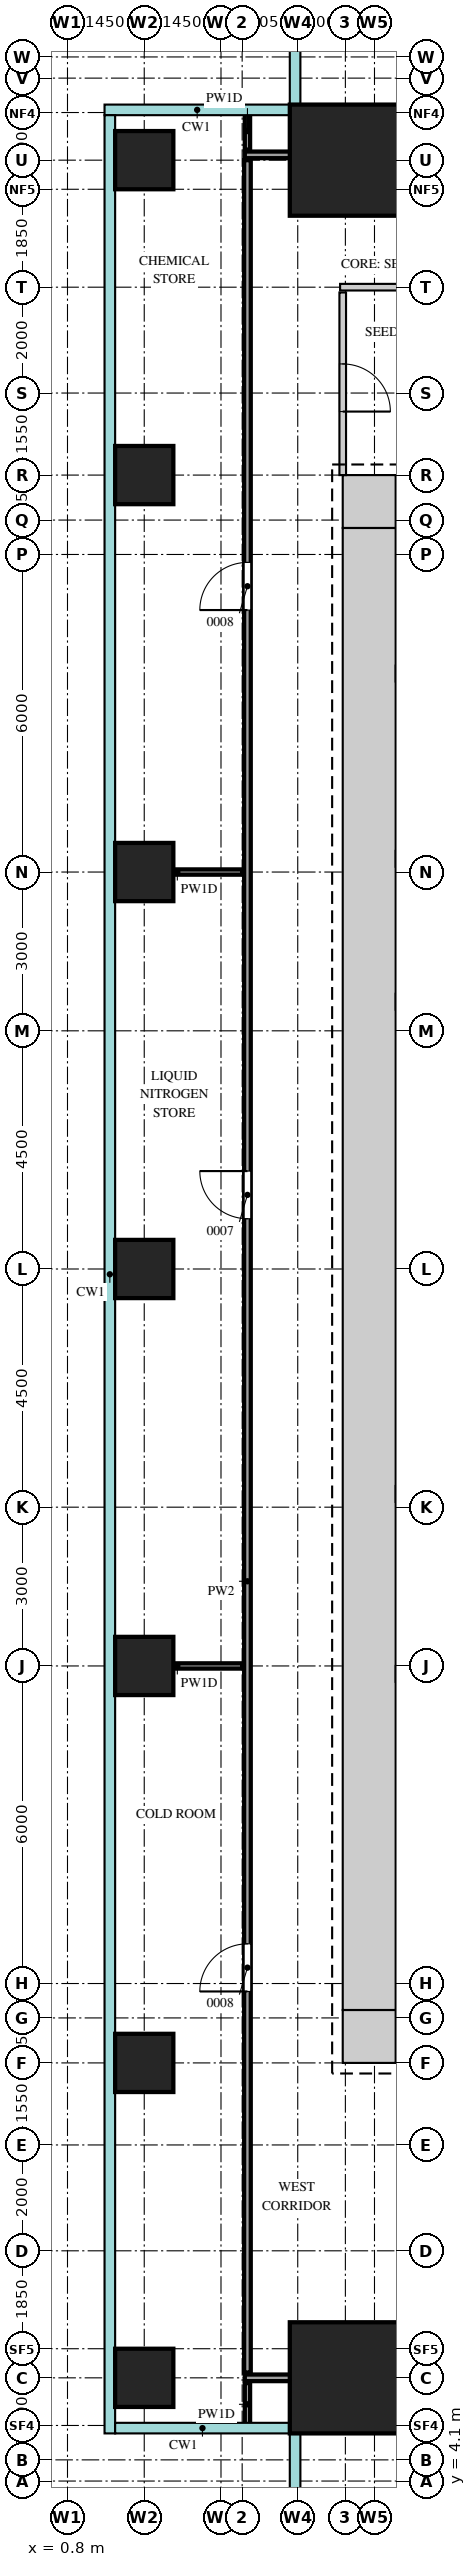
"""IFC4 building model, lengths in metres.
Left out: names, types, materials, properties, quantities, classifications, styles, units other than length and angle.
Written with IfcOpenShell. Run it as: python <this file> out.ifc"""

import sys

from ifc_helpers import new_model, si_unit, direction, frame, frame_2d, origin, origin_2d, place, context, subcontext, project, spatial, rectangle, extrude, source, transform, mapped, element, fill, save


model = new_model("IFC4")
c1 = context("Model", 3, precision=1e-05, world=origin(), true_north=direction((0.0, 1.0)))
c2 = subcontext(c1, "Body", "Model", "MODEL_VIEW")
j1 = project(units=[si_unit("LENGTHUNIT", "METRE"), si_unit("PLANEANGLEUNIT", "RADIAN")], contexts=[c1])
p1 = place(None, origin())
s1 = spatial("IfcSite", under=j1, at=p1, CompositionType="ELEMENT")
p2 = place(p1, origin())
s2 = spatial("IfcBuilding", under=s1, at=p2, CompositionType="ELEMENT")
p3 = place(p2, frame((0.0, 0.0, 110.3)))
s3 = spatial("IfcBuildingStorey", under=s2, at=p3, CompositionType="ELEMENT", Elevation=110.3)
m1 = source(origin(), c2, "Body", "SweptSolid", [
    extrude(rectangle(XDim=1.0, YDim=1.0, at=frame_2d((0.5, 0.0))), origin(), (0.0, 0.0, 1.0), 4.1),
])
for number, where, z_axis, x_axis in (
    (1, (6.0, 41.5, 0.0), (0.0, 0.0, 1.0), (1.0, 0.0, 0.0)),
    (2, (6.0, 12.5, 0.0), (0.0, 0.0, 1.0), (1.0, 0.0, 0.0)),
):
    element("IfcWall", number, at=place(p3, frame(where, z_axis=z_axis, x_axis=x_axis)), inside=s3, PredefinedType="SHEAR", context=c2, shape_type="MappedRepresentation", body=[
        mapped(m1, transform((0.0, 0.0, 0.0))),
    ])
m2 = source(origin(), c2, "Body", "SweptSolid", [
    extrude(rectangle(XDim=28.0, YDim=1.0, at=frame_2d((14.0, 0.0))), origin(), (0.0, 0.0, 1.0), 4.1),
])
p4 = place(p3, frame((6.5, 13.0, 0.0), z_axis=(0.0, 0.0, 1.0), x_axis=(0.0, 1.0, 0.0)))
e3 = element("IfcWall", 3, at=p4, inside=s3, PredefinedType="SHEAR", context=c2, shape_type="MappedRepresentation", body=[
    mapped(m2, transform((0.0, 0.0, 0.0))),
])
m3 = source(origin(), c2, "Body", "SweptSolid", [
    extrude(rectangle(XDim=2.1, YDim=2.1, at=origin_2d()), origin(), (0.0, 0.0, 1.0), 4.4),
])
for number, where, z_axis, x_axis in (
    (4, (6.05, 47.95, 0.0), (0.0, 0.0, 1.0), (1.0, 0.0, 0.0)),
    (5, (6.05, 6.05, 0.0), (0.0, 0.0, 1.0), (1.0, 0.0, 0.0)),
):
    element("IfcColumn", number, at=place(p3, frame(where, z_axis=z_axis, x_axis=x_axis)), inside=s3, PredefinedType="COLUMN", context=c2, shape_type="MappedRepresentation", body=[
        mapped(m3, transform((0.0, 0.0, 0.0))),
    ])
m4 = source(origin(), c2, "Body", "SweptSolid", [
    extrude(rectangle(XDim=1.1, YDim=1.1, at=origin_2d()), origin(), (0.0, 0.0, 1.0), 4.1),
])
for number, where, z_axis, x_axis in (
    (6, (2.25, 6.05, 0.0), (0.0, 0.0, 1.0), (1.0, 0.0, 0.0)),
    (7, (2.25, 12.0, 0.0), (0.0, 0.0, 1.0), (1.0, 0.0, 0.0)),
    (8, (2.25, 19.5, 0.0), (0.0, 0.0, 1.0), (1.0, 0.0, 0.0)),
    (9, (2.25, 27.0, 0.0), (0.0, 0.0, 1.0), (1.0, 0.0, 0.0)),
    (10, (2.25, 34.5, 0.0), (0.0, 0.0, 1.0), (1.0, 0.0, 0.0)),
    (11, (2.25, 42.0, 0.0), (0.0, 0.0, 1.0), (1.0, 0.0, 0.0)),
    (12, (2.25, 47.95, 0.0), (0.0, 0.0, 1.0), (1.0, 0.0, 0.0)),
):
    element("IfcColumn", number, at=place(p3, frame(where, z_axis=z_axis, x_axis=x_axis)), inside=s3, PredefinedType="COLUMN", context=c2, shape_type="MappedRepresentation", body=[
        mapped(m4, transform((0.0, 0.0, 0.0))),
    ])
m5 = source(origin(), c2, "Body", "SweptSolid", [
    extrude(rectangle(XDim=0.8, YDim=0.1, at=frame_2d((0.4, 0.0))), origin(), (0.0, 0.0, 1.0), 4.2),
])
p5 = place(p3, frame((4.2, 5.15, 0.0), z_axis=(0.0, 0.0, 1.0), x_axis=(0.0, 1.0, 0.0)))
e13 = element("IfcWall", 13, at=p5, inside=s3, PredefinedType="PARTITIONING", context=c2, shape_type="MappedRepresentation", body=[
    mapped(m5, transform((0.0, 0.0, 0.0))),
])
m6 = source(origin(), c2, "Body", "SweptSolid", [
    extrude(rectangle(XDim=22.3, YDim=0.125, at=frame_2d((11.15, 0.0))), origin(), (0.0, 0.0, 1.0), 3.55),
])
p6 = place(p3, frame((4.15, 6.05, 0.0), z_axis=(0.0, 0.0, 1.0), x_axis=(1.0, 0.0, 0.0)))
e14 = element("IfcWall", 14, at=p6, inside=s3, PredefinedType="PARTITIONING", context=c2, shape_type="MappedRepresentation", body=[
    mapped(m6, transform((0.0, 0.0, 0.0))),
])
m7 = source(origin(), c2, "Body", "SweptSolid", [
    extrude(rectangle(XDim=0.9, YDim=2.1, at=frame_2d((0.45, 1.05))), frame((0.0, 0.073, 0.0), z_axis=(0.0, -1.0, 0.0), x_axis=(1.0, 0.0, 0.0)), (0.0, 0.0, 1.0), 0.145),
])
p7 = place(p6, frame((3.5, 0.0, 0.0)))
e15 = element("IfcOpeningElement", 15, at=p7, cuts=e14, PredefinedType="OPENING", context=c2, shape_type="MappedRepresentation", body=[
    mapped(m7, transform((0.0, 0.0, 0.0))),
])
p8 = place(p6, frame((11.0, 0.0, 0.0)))
e16 = element("IfcOpeningElement", 16, at=p8, cuts=e14, PredefinedType="OPENING", context=c2, shape_type="MappedRepresentation", body=[
    mapped(m7, transform((0.0, 0.0, 0.0))),
])
p9 = place(p6, frame((18.35, 0.0, 0.0)))
e17 = element("IfcOpeningElement", 17, at=p9, cuts=e14, PredefinedType="OPENING", context=c2, shape_type="MappedRepresentation", body=[
    mapped(m7, transform((0.0, 0.0, 0.0))),
])
m8 = source(origin(), c2, "Body", "SweptSolid", [
    extrude(rectangle(XDim=41.8, YDim=0.125, at=frame_2d((20.9, 0.0))), origin(), (0.0, 0.0, 1.0), 4.2),
])
p10 = place(p3, frame((4.2, 6.15, 0.0), z_axis=(0.0, 0.0, 1.0), x_axis=(0.0, 1.0, 0.0)))
e18 = element("IfcWall", 18, at=p10, inside=s3, PredefinedType="PARTITIONING", context=c2, shape_type="MappedRepresentation", body=[
    mapped(m8, transform((0.0, 0.0, 0.0))),
])
p11 = place(p10, frame((7.2, 0.0, 0.0)))
e19 = element("IfcOpeningElement", 19, at=p11, cuts=e18, PredefinedType="OPENING", context=c2, shape_type="MappedRepresentation", body=[
    mapped(m7, transform((0.0, 0.0, 0.0))),
])
p12 = place(p10, frame((21.8, 0.0, 0.0)))
e20 = element("IfcOpeningElement", 20, at=p12, cuts=e18, PredefinedType="OPENING", context=c2, shape_type="MappedRepresentation", body=[
    mapped(m7, transform((0.0, 0.0, 0.0))),
])
p13 = place(p10, frame((33.3, 0.0, 0.0)))
e21 = element("IfcOpeningElement", 21, at=p13, cuts=e18, PredefinedType="OPENING", context=c2, shape_type="MappedRepresentation", body=[
    mapped(m7, transform((0.0, 0.0, 0.0))),
])
m9 = source(origin(), c2, "Body", "SweptSolid", [
    extrude(rectangle(XDim=2.45, YDim=0.1, at=frame_2d((1.225, 0.0))), origin(), (0.0, 0.0, 1.0), 4.2),
])
for number, where, z_axis, x_axis in (
    (22, (1.65, 19.5, 0.0), (0.0, 0.0, 1.0), (1.0, 0.0, 0.0)),
    (23, (1.65, 34.5, 0.0), (0.0, 0.0, 1.0), (1.0, 0.0, 0.0)),
):
    element("IfcWall", number, at=place(p3, frame(where, z_axis=z_axis, x_axis=x_axis)), inside=s3, PredefinedType="PARTITIONING", context=c2, shape_type="MappedRepresentation", body=[
        mapped(m9, transform((0.0, 0.0, 0.0))),
    ])
m10 = source(origin(), c2, "Body", "SweptSolid", [
    extrude(rectangle(XDim=3.45, YDim=0.125, at=frame_2d((1.725, 0.0))), origin(), (0.0, 0.0, 1.0), 4.2),
])
p14 = place(p3, frame((6.0, 42.0, 0.0), z_axis=(0.0, 0.0, 1.0), x_axis=(0.0, 1.0, 0.0)))
e24 = element("IfcWall", 24, at=p14, inside=s3, PredefinedType="PARTITIONING", context=c2, shape_type="MappedRepresentation", body=[
    mapped(m10, transform((0.0, 0.0, 0.0))),
])
p15 = place(p14, frame((1.2, 0.0, 0.0)))
e25 = element("IfcOpeningElement", 25, at=p15, cuts=e24, PredefinedType="OPENING", context=c2, shape_type="MappedRepresentation", body=[
    mapped(m7, transform((0.0, 0.0, 0.0))),
])
m11 = source(origin(), c2, "Body", "SweptSolid", [
    extrude(rectangle(XDim=7.95, YDim=0.125, at=frame_2d((3.975, 0.0))), origin(), (0.0, 0.0, 1.0), 4.2),
])
p16 = place(p3, frame((5.95, 45.55, 0.0), z_axis=(0.0, 0.0, 1.0), x_axis=(1.0, 0.0, 0.0)))
e26 = element("IfcWall", 26, at=p16, inside=s3, PredefinedType="PARTITIONING", context=c2, shape_type="MappedRepresentation", body=[
    mapped(m11, transform((0.0, 0.0, 0.0))),
])
p17 = place(p16, frame((3.3, 0.0, 0.0)))
e27 = element("IfcOpeningElement", 27, at=p17, cuts=e26, PredefinedType="OPENING", context=c2, shape_type="MappedRepresentation", body=[
    mapped(m7, transform((0.0, 0.0, 0.0))),
])
p18 = place(p16, frame((6.1, 0.0, 0.0)))
e28 = element("IfcOpeningElement", 28, at=p18, cuts=e26, PredefinedType="OPENING", context=c2, shape_type="MappedRepresentation", body=[
    mapped(m7, transform((0.0, 0.0, 0.0))),
])
m12 = source(origin(), c2, "Body", "SweptSolid", [
    extrude(rectangle(XDim=42.2, YDim=0.125, at=frame_2d((21.1, 0.0))), origin(), (0.0, 0.0, 1.0), 3.55),
])
p19 = place(p3, frame((4.15, 48.05, 0.0), z_axis=(0.0, 0.0, 1.0), x_axis=(1.0, 0.0, 0.0)))
e29 = element("IfcWall", 29, at=p19, inside=s3, PredefinedType="PARTITIONING", context=c2, shape_type="MappedRepresentation", body=[
    mapped(m12, transform((0.0, 0.0, 0.0))),
])
p20 = place(p19, frame((7.25, 0.0, 0.0)))
e30 = element("IfcOpeningElement", 30, at=p20, cuts=e29, PredefinedType="OPENING", context=c2, shape_type="MappedRepresentation", body=[
    mapped(m7, transform((0.0, 0.0, 0.0))),
])
m13 = source(origin(), c2, "Body", "SweptSolid", [
    extrude(rectangle(XDim=1.2, YDim=2.1, at=frame_2d((0.6, 1.05))), frame((0.0, 0.073, 0.0), z_axis=(0.0, -1.0, 0.0), x_axis=(1.0, 0.0, 0.0)), (0.0, 0.0, 1.0), 0.145),
])
p21 = place(p19, frame((28.35, 0.0, 0.0)))
e31 = element("IfcOpeningElement", 31, at=p21, cuts=e29, PredefinedType="OPENING", context=c2, shape_type="MappedRepresentation", body=[
    mapped(m13, transform((0.0, 0.0, 0.0))),
])
m14 = source(origin(), c2, "Body", "SweptSolid", [
    extrude(rectangle(XDim=0.7, YDim=0.1, at=frame_2d((0.35, 0.0))), origin(), (0.0, 0.0, 1.0), 4.2),
])
p22 = place(p3, frame((4.2, 48.15, 0.0), z_axis=(0.0, 0.0, 1.0), x_axis=(0.0, 1.0, 0.0)))
e32 = element("IfcWall", 32, at=p22, inside=s3, PredefinedType="PARTITIONING", context=c2, shape_type="MappedRepresentation", body=[
    mapped(m14, transform((0.0, 0.0, 0.0))),
])
m15 = source(origin(), c2, "Body", "SweptSolid", [
    extrude(rectangle(XDim=0.9, YDim=2.1, at=frame_2d((0.45, 1.05))), frame((0.0, 0.025, 0.0), z_axis=(0.0, -1.0, 0.0), x_axis=(1.0, 0.0, 0.0)), (0.0, 0.0, 1.0), 0.05),
])
p23 = place(p11, origin())
e33 = element("IfcDoor", 33, at=p23, inside=s3, OperationType="SINGLE_SWING_RIGHT", PredefinedType="DOOR", context=c2, shape_type="MappedRepresentation", body=[
    mapped(m15, transform((0.0, 0.0, 0.0))),
])
fill(e19, e33)
p24 = place(p12, origin())
e34 = element("IfcDoor", 34, at=p24, inside=s3, OperationType="SINGLE_SWING_LEFT", PredefinedType="DOOR", context=c2, shape_type="MappedRepresentation", body=[
    mapped(m15, transform((0.0, 0.0, 0.0))),
])
fill(e20, e34)
p25 = place(p13, origin())
e35 = element("IfcDoor", 35, at=p25, inside=s3, OperationType="SINGLE_SWING_RIGHT", PredefinedType="DOOR", context=c2, shape_type="MappedRepresentation", body=[
    mapped(m15, transform((0.0, 0.0, 0.0))),
])
fill(e21, e35)
p26 = place(p15, origin())
e36 = element("IfcDoor", 36, at=p26, inside=s3, OperationType="SINGLE_SWING_LEFT", PredefinedType="DOOR", context=c2, shape_type="MappedRepresentation", body=[
    mapped(m15, transform((0.0, 0.0, 0.0))),
])
fill(e25, e36)
save(model, sys.argv[1])
